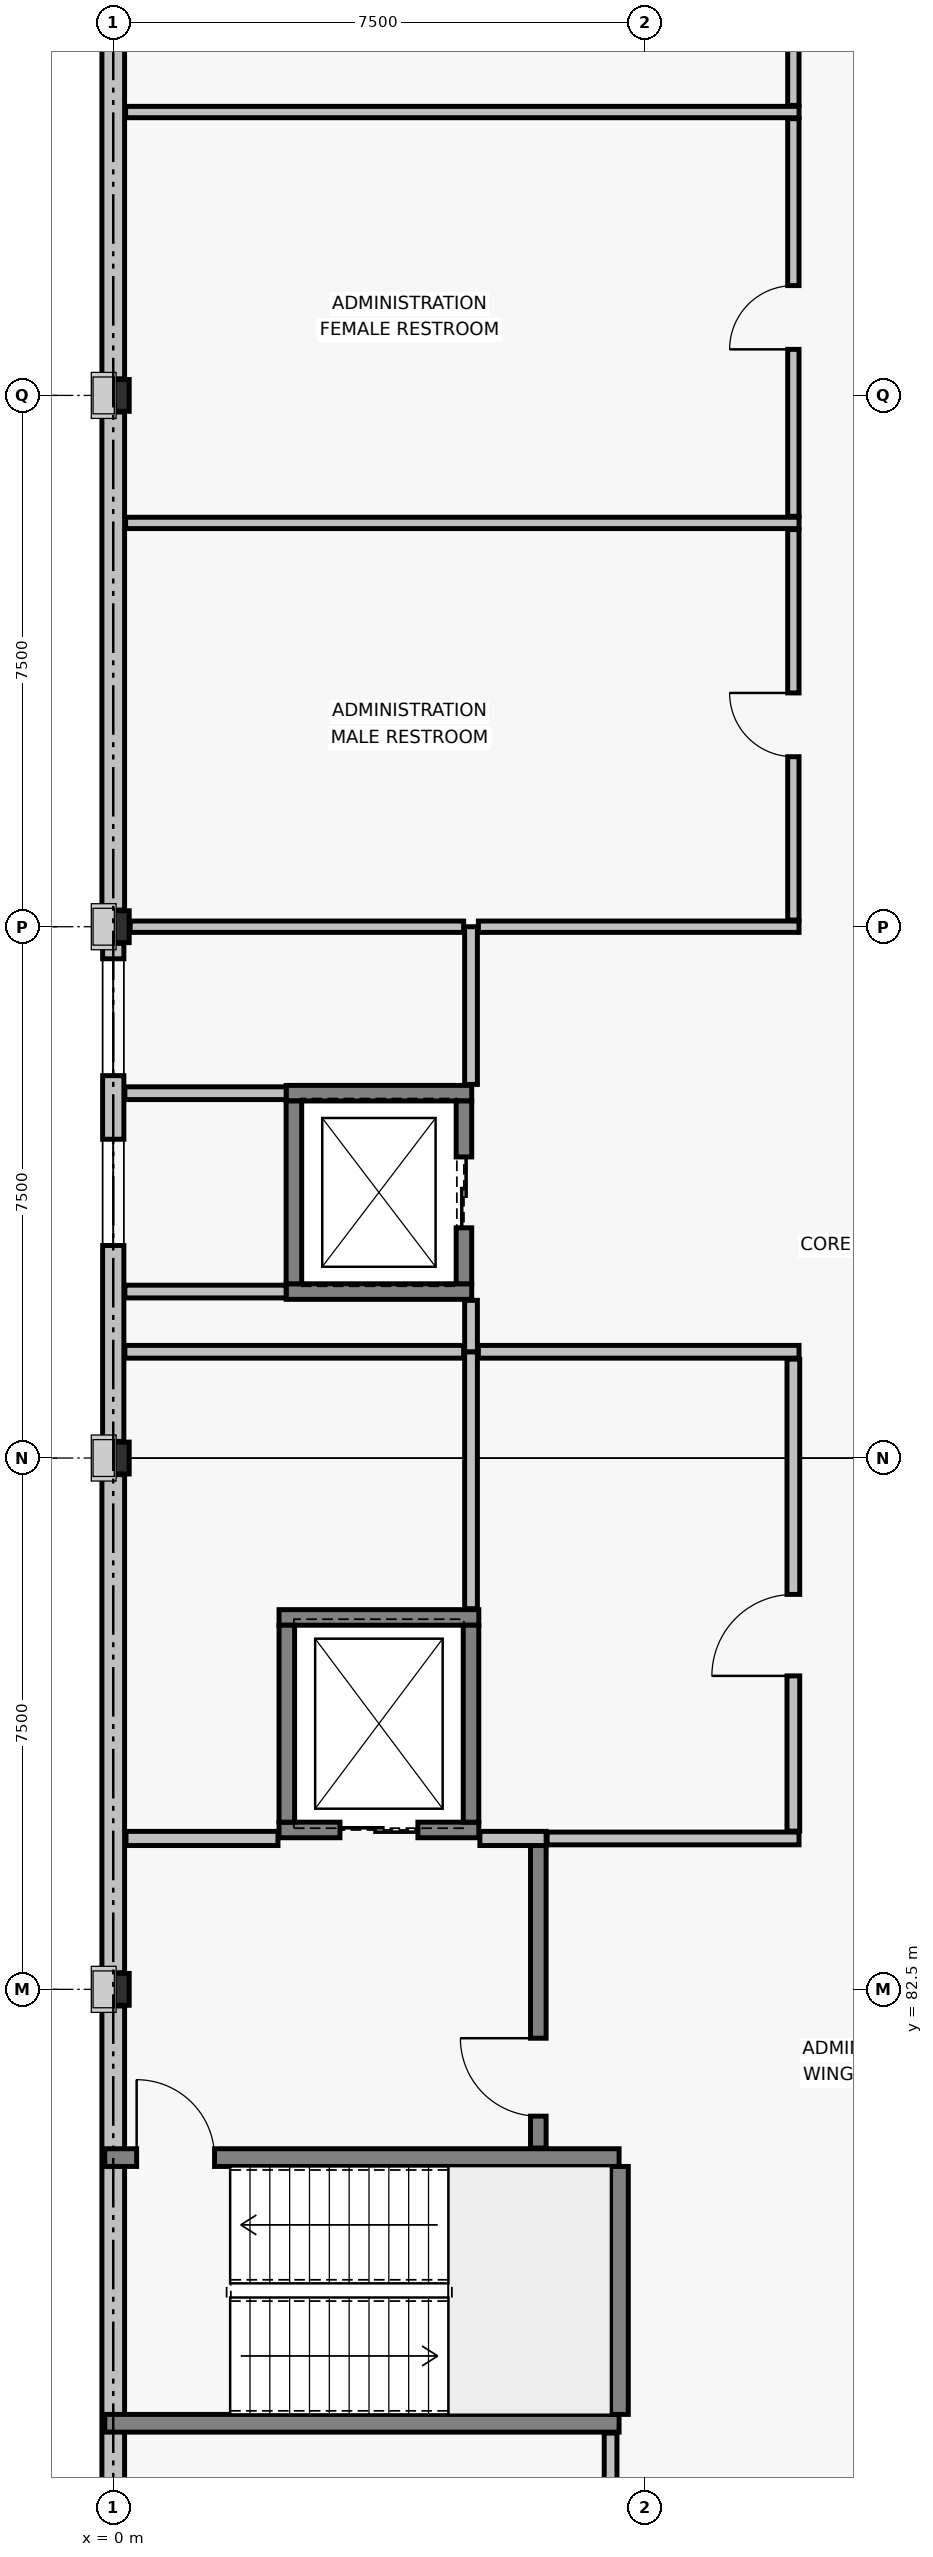
"""IFC4 building model, lengths in metres.
Left out: names, types, materials, properties, quantities, classifications, styles, units other than length and angle.
Written with IfcOpenShell. Run it as: python <this file> out.ifc"""

import sys

from ifc_helpers import new_model, si_unit, direction, frame, frame_2d, origin, origin_2d, place, context, subcontext, project, spatial, rectangle, extrude, element, fill, save


model = new_model("IFC4")
c1 = context("Model", 3, precision=1e-05, world=origin(), true_north=direction((0.0, 1.0)))
c2 = subcontext(c1, "Body", "Model", "MODEL_VIEW")
j1 = project(units=[si_unit("LENGTHUNIT", "METRE"), si_unit("PLANEANGLEUNIT", "RADIAN")], contexts=[c1])
p1 = place(None, origin())
s1 = spatial("IfcSite", under=j1, at=p1, CompositionType="ELEMENT")
p2 = place(p1, origin())
s2 = spatial("IfcBuilding", under=s1, at=p2, CompositionType="ELEMENT")
p3 = place(p2, frame((0.0, 0.0, 21.0)))
s3 = spatial("IfcBuildingStorey", under=s2, at=p3, CompositionType="ELEMENT", Elevation=21.0)
for number, where, z_axis, x_axis in (
    (1, (0.0, 82.5, 0.0), (0.0, 0.0, 1.0), (1.0, 0.0, 0.0)),
    (2, (0.0, 90.0, 0.0), (0.0, 0.0, 1.0), (1.0, 0.0, 0.0)),
    (3, (0.0, 97.5, 0.0), (0.0, 0.0, 1.0), (1.0, 0.0, 0.0)),
    (4, (0.0, 105.0, 0.0), (0.0, 0.0, 1.0), (1.0, 0.0, 0.0)),
):
    element("IfcColumn", number, at=place(p3, frame(where, z_axis=z_axis, x_axis=x_axis)), inside=s3, PredefinedType="COLUMN", context=c2, shape_type="SweptSolid", body=[
        extrude(rectangle(XDim=0.45, YDim=0.45, at=origin_2d()), origin(), (0.0, 0.0, 1.0), 4.2),
    ])
for number, where, z_axis, x_axis in (
    (5, (0.0, 75.235, 0.0), (0.0, 0.0, 1.0), (0.0, 1.0, 0.0)),
    (6, (0.0, 82.735, 0.0), (0.0, 0.0, 1.0), (0.0, 1.0, 0.0)),
):
    element("IfcWall", number, at=place(p3, frame(where, z_axis=z_axis, x_axis=x_axis)), inside=s3, PredefinedType="SOLIDWALL", context=c2, shape_type="SweptSolid", body=[
        extrude(rectangle(XDim=7.03, YDim=0.32, at=frame_2d((3.515, 0.0))), origin(), (0.0, 0.0, 1.0), 2.89),
    ])
p4 = place(p3, frame((0.0, 90.235, 0.0), z_axis=(0.0, 0.0, 1.0), x_axis=(0.0, 1.0, 0.0)))
e7 = element("IfcWall", 7, at=p4, inside=s3, PredefinedType="SOLIDWALL", context=c2, shape_type="SweptSolid", body=[
    extrude(rectangle(XDim=7.03, YDim=0.3, at=frame_2d((3.515, 0.0))), origin(), (0.0, 0.0, 1.0), 2.89),
])
p5 = place(p4, frame((2.765, 0.0, 0.6)))
e8 = element("IfcOpeningElement", 8, at=p5, cuts=e7, PredefinedType="OPENING", context=c2, shape_type="SweptSolid", body=[
    extrude(rectangle(XDim=1.5, YDim=1.2, at=frame_2d((0.75, 0.6))), frame((0.0, 0.16, 0.0), z_axis=(0.0, -1.0, 0.0), x_axis=(1.0, 0.0, 0.0)), (0.0, 0.0, 1.0), 0.32),
])
p6 = place(p4, frame((5.163, 0.0, 0.6)))
e9 = element("IfcOpeningElement", 9, at=p6, cuts=e7, PredefinedType="OPENING", context=c2, shape_type="SweptSolid", body=[
    extrude(rectangle(XDim=1.65, YDim=1.15, at=frame_2d((0.825, 0.575))), frame((0.0, 0.16, 0.0), z_axis=(0.0, -1.0, 0.0), x_axis=(1.0, 0.0, 0.0)), (0.0, 0.0, 1.0), 0.32),
])
for number, where, z_axis, x_axis in (
    (10, (0.0, 97.735, 0.0), (0.0, 0.0, 1.0), (0.0, 1.0, 0.0)),
    (11, (0.0, 105.235, 0.0), (0.0, 0.0, 1.0), (0.0, 1.0, 0.0)),
):
    element("IfcWall", number, at=place(p3, frame(where, z_axis=z_axis, x_axis=x_axis)), inside=s3, PredefinedType="SOLIDWALL", context=c2, shape_type="SweptSolid", body=[
        extrude(rectangle(XDim=7.03, YDim=0.32, at=frame_2d((3.515, 0.0))), origin(), (0.0, 0.0, 1.0), 2.89),
    ])
p7 = place(p3, frame((-0.12, 76.375, 0.0), z_axis=(0.0, 0.0, 1.0), x_axis=(1.0, 0.0, 0.0)))
e12 = element("IfcWall", 12, at=p7, inside=s3, PredefinedType="SOLIDWALL", context=c2, shape_type="SweptSolid", body=[
    extrude(rectangle(XDim=7.26, YDim=0.25, at=frame_2d((3.63, 0.0))), origin(), (0.0, 0.0, 1.0), 3.92),
])
p8 = place(p3, frame((-0.12, 80.125, 0.0), z_axis=(0.0, 0.0, 1.0), x_axis=(1.0, 0.0, 0.0)))
e13 = element("IfcWall", 13, at=p8, inside=s3, PredefinedType="SOLIDWALL", context=c2, shape_type="SweptSolid", body=[
    extrude(rectangle(XDim=7.26, YDim=0.25, at=frame_2d((3.63, 0.0))), origin(), (0.0, 0.0, 1.0), 3.92),
])
p9 = place(p8, frame((0.45, 0.0, 0.0)))
e14 = element("IfcOpeningElement", 14, at=p9, cuts=e13, PredefinedType="OPENING", context=c2, shape_type="SweptSolid", body=[
    extrude(rectangle(XDim=1.1, YDim=2.15, at=frame_2d((0.55, 1.075))), frame((0.0, 0.135, 0.0), z_axis=(0.0, -1.0, 0.0), x_axis=(1.0, 0.0, 0.0)), (0.0, 0.0, 1.0), 0.27),
])
p10 = place(p3, frame((7.145, 76.5, 0.0), z_axis=(0.0, 0.0, 1.0), x_axis=(0.0, 1.0, 0.0)))
e15 = element("IfcWall", 15, at=p10, inside=s3, PredefinedType="SOLIDWALL", context=c2, shape_type="SweptSolid", body=[
    extrude(rectangle(XDim=3.5, YDim=0.25, at=frame_2d((1.75, 0.0))), origin(), (0.0, 0.0, 1.0), 3.92),
])
for number, where, z_axis, x_axis in (
    (16, (2.44, 92.35, 0.0), (0.0, 0.0, 1.0), (1.0, 0.0, 0.0)),
    (17, (2.44, 95.15, 0.0), (0.0, 0.0, 1.0), (1.0, 0.0, 0.0)),
):
    element("IfcWall", number, at=place(p3, frame(where, z_axis=z_axis, x_axis=x_axis)), inside=s3, PredefinedType="SOLIDWALL", context=c2, shape_type="SweptSolid", body=[
        extrude(rectangle(XDim=2.62, YDim=0.22, at=frame_2d((1.31, 0.0))), origin(), (0.0, 0.0, 1.0), 3.92),
    ])
p11 = place(p3, frame((2.55, 92.46, 0.0), z_axis=(0.0, 0.0, 1.0), x_axis=(0.0, 1.0, 0.0)))
e18 = element("IfcWall", 18, at=p11, inside=s3, PredefinedType="SOLIDWALL", context=c2, shape_type="SweptSolid", body=[
    extrude(rectangle(XDim=2.58, YDim=0.22, at=frame_2d((1.29, 0.0))), origin(), (0.0, 0.0, 1.0), 3.92),
])
p12 = place(p3, frame((4.95, 92.46, 0.0), z_axis=(0.0, 0.0, 1.0), x_axis=(0.0, 1.0, 0.0)))
e19 = element("IfcWall", 19, at=p12, inside=s3, PredefinedType="SOLIDWALL", context=c2, shape_type="SweptSolid", body=[
    extrude(rectangle(XDim=2.58, YDim=0.22, at=frame_2d((1.29, 0.0))), origin(), (0.0, 0.0, 1.0), 3.92),
])
p13 = place(p12, frame((0.79, 0.0, 0.0)))
e20 = element("IfcOpeningElement", 20, at=p13, cuts=e19, PredefinedType="OPENING", context=c2, shape_type="SweptSolid", body=[
    extrude(rectangle(XDim=1.0, YDim=2.15, at=frame_2d((0.5, 1.075))), frame((0.0, 0.12, 0.0), z_axis=(0.0, -1.0, 0.0), x_axis=(1.0, 0.0, 0.0)), (0.0, 0.0, 1.0), 0.24),
])
p14 = place(p3, frame((2.34, 84.75, 0.0), z_axis=(0.0, 0.0, 1.0), x_axis=(1.0, 0.0, 0.0)))
e21 = element("IfcWall", 21, at=p14, inside=s3, PredefinedType="SOLIDWALL", context=c2, shape_type="SweptSolid", body=[
    extrude(rectangle(XDim=2.82, YDim=0.22, at=frame_2d((1.41, 0.0))), origin(), (0.0, 0.0, 1.0), 3.92),
])
p15 = place(p14, frame((0.86, 0.0, 0.0)))
e22 = element("IfcOpeningElement", 22, at=p15, cuts=e21, PredefinedType="OPENING", context=c2, shape_type="SweptSolid", body=[
    extrude(rectangle(XDim=1.1, YDim=2.15, at=frame_2d((0.55, 1.075))), frame((0.0, 0.12, 0.0), z_axis=(0.0, -1.0, 0.0), x_axis=(1.0, 0.0, 0.0)), (0.0, 0.0, 1.0), 0.24),
])
p16 = place(p3, frame((2.34, 87.75, 0.0), z_axis=(0.0, 0.0, 1.0), x_axis=(1.0, 0.0, 0.0)))
e23 = element("IfcWall", 23, at=p16, inside=s3, PredefinedType="SOLIDWALL", context=c2, shape_type="SweptSolid", body=[
    extrude(rectangle(XDim=2.82, YDim=0.22, at=frame_2d((1.41, 0.0))), origin(), (0.0, 0.0, 1.0), 3.92),
])
for number, where, z_axis, x_axis in (
    (24, (2.45, 84.86, 0.0), (0.0, 0.0, 1.0), (0.0, 1.0, 0.0)),
    (25, (5.05, 84.86, 0.0), (0.0, 0.0, 1.0), (0.0, 1.0, 0.0)),
):
    element("IfcWall", number, at=place(p3, frame(where, z_axis=z_axis, x_axis=x_axis)), inside=s3, PredefinedType="SOLIDWALL", context=c2, shape_type="SweptSolid", body=[
        extrude(rectangle(XDim=2.78, YDim=0.22, at=frame_2d((1.39, 0.0))), origin(), (0.0, 0.0, 1.0), 3.92),
    ])
p17 = place(p3, frame((6.0, 80.26, 0.0), z_axis=(0.0, 0.0, 1.0), x_axis=(0.0, 1.0, 0.0)))
e26 = element("IfcWall", 26, at=p17, inside=s3, PredefinedType="SOLIDWALL", context=c2, shape_type="SweptSolid", body=[
    extrude(rectangle(XDim=4.37, YDim=0.22, at=frame_2d((2.185, 0.0))), origin(), (0.0, 0.0, 1.0), 3.92),
])
p18 = place(p17, frame((0.45, 0.0, 0.0)))
e27 = element("IfcOpeningElement", 27, at=p18, cuts=e26, PredefinedType="OPENING", context=c2, shape_type="SweptSolid", body=[
    extrude(rectangle(XDim=1.1, YDim=2.15, at=frame_2d((0.55, 1.075))), frame((0.0, 0.12, 0.0), z_axis=(0.0, -1.0, 0.0), x_axis=(1.0, 0.0, 0.0)), (0.0, 0.0, 1.0), 0.24),
])
p19 = place(p3, frame((0.18, 84.63, 0.0), z_axis=(0.0, 0.0, 1.0), x_axis=(1.0, 0.0, 0.0)))
e28 = element("IfcWall", 28, at=p19, inside=s3, PredefinedType="PARTITIONING", context=c2, shape_type="SweptSolid", body=[
    extrude(rectangle(XDim=2.145, YDim=0.2, at=frame_2d((1.073, 0.0))), origin(), (0.0, 0.0, 1.0), 3.15),
])
p20 = place(p3, frame((5.175, 84.63, 0.0), z_axis=(0.0, 0.0, 1.0), x_axis=(1.0, 0.0, 0.0)))
e29 = element("IfcWall", 29, at=p20, inside=s3, PredefinedType="PARTITIONING", context=c2, shape_type="SweptSolid", body=[
    extrude(rectangle(XDim=0.935, YDim=0.2, at=frame_2d((0.468, 0.0))), origin(), (0.0, 0.0, 1.0), 3.6),
])
p21 = place(p3, frame((7.02, 75.0, 0.0), z_axis=(0.0, 0.0, 1.0), x_axis=(0.0, 1.0, 0.0)))
e30 = element("IfcWall", 30, at=p21, inside=s3, PredefinedType="PARTITIONING", context=c2, shape_type="SweptSolid", body=[
    extrude(rectangle(XDim=1.236, YDim=0.18, at=frame_2d((0.618, 0.0))), origin(), (0.0, 0.0, 1.0), 2.89),
])
p22 = place(p3, frame((5.05, 87.874, 0.0), z_axis=(0.0, 0.0, 1.0), x_axis=(0.0, 1.0, 0.0)))
e31 = element("IfcWall", 31, at=p22, inside=s3, PredefinedType="PARTITIONING", context=c2, shape_type="SweptSolid", body=[
    extrude(rectangle(XDim=3.626, YDim=0.18, at=frame_2d((1.813, 0.0))), origin(), (0.0, 0.0, 1.0), 2.89),
])
p23 = place(p3, frame((6.124, 84.63, 0.0), z_axis=(0.0, 0.0, 1.0), x_axis=(1.0, 0.0, 0.0)))
e32 = element("IfcWall", 32, at=p23, inside=s3, PredefinedType="PARTITIONING", context=c2, shape_type="SweptSolid", body=[
    extrude(rectangle(XDim=3.556, YDim=0.18, at=frame_2d((1.778, 0.0))), origin(), (0.0, 0.0, 1.0), 3.27),
])
p24 = place(p3, frame((0.164, 91.5, 0.0), z_axis=(0.0, 0.0, 1.0), x_axis=(1.0, 0.0, 0.0)))
e33 = element("IfcWall", 33, at=p24, inside=s3, PredefinedType="PARTITIONING", context=c2, shape_type="SweptSolid", body=[
    extrude(rectangle(XDim=4.782, YDim=0.18, at=frame_2d((2.391, 0.0))), origin(), (0.0, 0.0, 1.0), 3.14),
])
p25 = place(p3, frame((5.154, 91.5, 0.0), z_axis=(0.0, 0.0, 1.0), x_axis=(1.0, 0.0, 0.0)))
e34 = element("IfcWall", 34, at=p25, inside=s3, PredefinedType="PARTITIONING", context=c2, shape_type="SweptSolid", body=[
    extrude(rectangle(XDim=4.526, YDim=0.18, at=frame_2d((2.263, 0.0))), origin(), (0.0, 0.0, 1.0), 3.27),
])
p26 = place(p3, frame((9.6, 84.734, 0.0), z_axis=(0.0, 0.0, 1.0), x_axis=(0.0, 1.0, 0.0)))
e35 = element("IfcWall", 35, at=p26, inside=s3, PredefinedType="PARTITIONING", context=c2, shape_type="SweptSolid", body=[
    extrude(rectangle(XDim=6.662, YDim=0.18, at=frame_2d((3.331, 0.0))), origin(), (0.0, 0.0, 1.0), 2.89),
])
p27 = place(p26, frame((2.191, 0.0, 0.0)))
e36 = element("IfcOpeningElement", 36, at=p27, cuts=e35, PredefinedType="OPENING", context=c2, shape_type="SweptSolid", body=[
    extrude(rectangle(XDim=1.15, YDim=2.14, at=frame_2d((0.575, 1.07))), frame((0.0, 0.1, 0.0), z_axis=(0.0, -1.0, 0.0), x_axis=(1.0, 0.0, 0.0)), (0.0, 0.0, 1.0), 0.2),
])
for number, where, z_axis, x_axis in (
    (37, (0.164, 92.35, 0.0), (0.0, 0.0, 1.0), (1.0, 0.0, 0.0)),
    (38, (0.164, 95.15, 0.0), (0.0, 0.0, 1.0), (1.0, 0.0, 0.0)),
):
    element("IfcWall", number, at=place(p3, frame(where, z_axis=z_axis, x_axis=x_axis)), inside=s3, PredefinedType="PARTITIONING", context=c2, shape_type="SweptSolid", body=[
        extrude(rectangle(XDim=2.276, YDim=0.18, at=frame_2d((1.138, 0.0))), origin(), (0.0, 0.0, 1.0), 3.14),
    ])
p28 = place(p3, frame((5.05, 91.5, 0.0), z_axis=(0.0, 0.0, 1.0), x_axis=(0.0, 1.0, 0.0)))
e39 = element("IfcWall", 39, at=p28, inside=s3, PredefinedType="PARTITIONING", context=c2, shape_type="SweptSolid", body=[
    extrude(rectangle(XDim=0.726, YDim=0.18, at=frame_2d((0.363, 0.0))), origin(), (0.0, 0.0, 1.0), 3.27),
])
p29 = place(p3, frame((5.05, 95.274, 0.0), z_axis=(0.0, 0.0, 1.0), x_axis=(0.0, 1.0, 0.0)))
e40 = element("IfcWall", 40, at=p29, inside=s3, PredefinedType="PARTITIONING", context=c2, shape_type="SweptSolid", body=[
    extrude(rectangle(XDim=2.226, YDim=0.18, at=frame_2d((1.113, 0.0))), origin(), (0.0, 0.0, 1.0), 2.89),
])
p30 = place(p3, frame((0.239, 97.5, 0.0), z_axis=(0.0, 0.0, 1.0), x_axis=(1.0, 0.0, 0.0)))
e41 = element("IfcWall", 41, at=p30, inside=s3, PredefinedType="PARTITIONING", context=c2, shape_type="SweptSolid", body=[
    extrude(rectangle(XDim=4.707, YDim=0.16, at=frame_2d((2.354, 0.0))), origin(), (0.0, 0.0, 1.0), 2.89),
])
p31 = place(p3, frame((5.154, 97.5, 0.0), z_axis=(0.0, 0.0, 1.0), x_axis=(1.0, 0.0, 0.0)))
e42 = element("IfcWall", 42, at=p31, inside=s3, PredefinedType="PARTITIONING", context=c2, shape_type="SweptSolid", body=[
    extrude(rectangle(XDim=4.526, YDim=0.16, at=frame_2d((2.263, 0.0))), origin(), (0.0, 0.0, 1.0), 2.89),
])
p32 = place(p3, frame((0.174, 103.2, 0.0), z_axis=(0.0, 0.0, 1.0), x_axis=(1.0, 0.0, 0.0)))
e43 = element("IfcWall", 43, at=p32, inside=s3, PredefinedType="PARTITIONING", context=c2, shape_type="SweptSolid", body=[
    extrude(rectangle(XDim=9.506, YDim=0.16, at=frame_2d((4.753, 0.0))), origin(), (0.0, 0.0, 1.0), 3.27),
])
p33 = place(p3, frame((0.174, 109.0, 0.0), z_axis=(0.0, 0.0, 1.0), x_axis=(1.0, 0.0, 0.0)))
e44 = element("IfcWall", 44, at=p33, inside=s3, PredefinedType="PARTITIONING", context=c2, shape_type="SweptSolid", body=[
    extrude(rectangle(XDim=9.506, YDim=0.16, at=frame_2d((4.753, 0.0))), origin(), (0.0, 0.0, 1.0), 3.14),
])
p34 = place(p3, frame((9.6, 97.594, 0.0), z_axis=(0.0, 0.0, 1.0), x_axis=(0.0, 1.0, 0.0)))
e45 = element("IfcWall", 45, at=p34, inside=s3, PredefinedType="PARTITIONING", context=c2, shape_type="SweptSolid", body=[
    extrude(rectangle(XDim=5.512, YDim=0.16, at=frame_2d((2.756, 0.0))), origin(), (0.0, 0.0, 1.0), 2.89),
])
p35 = place(p34, frame((2.306, 0.0, 0.0)))
e46 = element("IfcOpeningElement", 46, at=p35, cuts=e45, PredefinedType="OPENING", context=c2, shape_type="SweptSolid", body=[
    extrude(rectangle(XDim=0.9, YDim=2.1, at=frame_2d((0.45, 1.05))), frame((0.0, 0.09, 0.0), z_axis=(0.0, -1.0, 0.0), x_axis=(1.0, 0.0, 0.0)), (0.0, 0.0, 1.0), 0.18),
])
p36 = place(p3, frame((9.6, 103.294, 0.0), z_axis=(0.0, 0.0, 1.0), x_axis=(0.0, 1.0, 0.0)))
e47 = element("IfcWall", 47, at=p36, inside=s3, PredefinedType="PARTITIONING", context=c2, shape_type="SweptSolid", body=[
    extrude(rectangle(XDim=5.612, YDim=0.16, at=frame_2d((2.806, 0.0))), origin(), (0.0, 0.0, 1.0), 2.89),
])
p37 = place(p36, frame((2.356, 0.0, 0.0)))
e48 = element("IfcOpeningElement", 48, at=p37, cuts=e47, PredefinedType="OPENING", context=c2, shape_type="SweptSolid", body=[
    extrude(rectangle(XDim=0.9, YDim=2.1, at=frame_2d((0.45, 1.05))), frame((0.0, 0.09, 0.0), z_axis=(0.0, -1.0, 0.0), x_axis=(1.0, 0.0, 0.0)), (0.0, 0.0, 1.0), 0.18),
])
p38 = place(p3, frame((9.6, 109.094, 0.0), z_axis=(0.0, 0.0, 1.0), x_axis=(0.0, 1.0, 0.0)))
e49 = element("IfcWall", 49, at=p38, inside=s3, PredefinedType="PARTITIONING", context=c2, shape_type="SweptSolid", body=[
    extrude(rectangle(XDim=3.242, YDim=0.16, at=frame_2d((1.621, 0.0))), origin(), (0.0, 0.0, 1.0), 2.89),
])
p39 = place(p38, frame((1.181, 0.0, 0.0)))
e50 = element("IfcOpeningElement", 50, at=p39, cuts=e49, PredefinedType="OPENING", context=c2, shape_type="SweptSolid", body=[
    extrude(rectangle(XDim=0.95, YDim=2.1, at=frame_2d((0.475, 1.05))), frame((0.0, 0.09, 0.0), z_axis=(0.0, -1.0, 0.0), x_axis=(1.0, 0.0, 0.0)), (0.0, 0.0, 1.0), 0.18),
])
p40 = place(p5, origin())
e51 = element("IfcWindow", 51, at=p40, inside=s3, PartitioningType="SINGLE_PANEL", PredefinedType="WINDOW", context=c2, shape_type="SweptSolid", body=[
    extrude(rectangle(XDim=1.5, YDim=1.2, at=frame_2d((0.75, 0.6))), frame((0.0, 0.03, 0.0), z_axis=(0.0, -1.0, 0.0), x_axis=(1.0, 0.0, 0.0)), (0.0, 0.0, 1.0), 0.06),
])
fill(e8, e51)
p41 = place(p6, origin())
e52 = element("IfcWindow", 52, at=p41, inside=s3, PartitioningType="SINGLE_PANEL", PredefinedType="WINDOW", context=c2, shape_type="SweptSolid", body=[
    extrude(rectangle(XDim=1.65, YDim=1.15, at=frame_2d((0.825, 0.575))), frame((0.0, 0.03, 0.0), z_axis=(0.0, -1.0, 0.0), x_axis=(1.0, 0.0, 0.0)), (0.0, 0.0, 1.0), 0.06),
])
fill(e9, e52)
p42 = place(p9, origin())
e53 = element("IfcDoor", 53, at=p42, inside=s3, OperationType="SINGLE_SWING_LEFT", PredefinedType="DOOR", context=c2, shape_type="SweptSolid", body=[
    extrude(rectangle(XDim=1.1, YDim=2.15, at=frame_2d((0.55, 1.075))), frame((0.0, 0.025, 0.0), z_axis=(0.0, -1.0, 0.0), x_axis=(1.0, 0.0, 0.0)), (0.0, 0.0, 1.0), 0.05),
])
fill(e14, e53)
p43 = place(p13, origin())
e54 = element("IfcDoor", 54, at=p43, inside=s3, OperationType="SLIDING_TO_LEFT", PredefinedType="DOOR", context=c2, shape_type="SweptSolid", body=[
    extrude(rectangle(XDim=1.0, YDim=2.15, at=frame_2d((0.5, 1.075))), frame((0.0, 0.025, 0.0), z_axis=(0.0, -1.0, 0.0), x_axis=(1.0, 0.0, 0.0)), (0.0, 0.0, 1.0), 0.05),
])
fill(e20, e54)
p44 = place(p15, origin())
e55 = element("IfcDoor", 55, at=p44, inside=s3, OperationType="SLIDING_TO_LEFT", PredefinedType="DOOR", context=c2, shape_type="SweptSolid", body=[
    extrude(rectangle(XDim=1.1, YDim=2.15, at=frame_2d((0.55, 1.075))), frame((0.0, 0.025, 0.0), z_axis=(0.0, -1.0, 0.0), x_axis=(1.0, 0.0, 0.0)), (0.0, 0.0, 1.0), 0.05),
])
fill(e22, e55)
p45 = place(p18, origin())
e56 = element("IfcDoor", 56, at=p45, inside=s3, OperationType="SINGLE_SWING_RIGHT", PredefinedType="DOOR", context=c2, shape_type="SweptSolid", body=[
    extrude(rectangle(XDim=1.1, YDim=2.15, at=frame_2d((0.55, 1.075))), frame((0.0, 0.025, 0.0), z_axis=(0.0, -1.0, 0.0), x_axis=(1.0, 0.0, 0.0)), (0.0, 0.0, 1.0), 0.05),
])
fill(e27, e56)
p46 = place(p27, origin())
e57 = element("IfcDoor", 57, at=p46, inside=s3, OperationType="SINGLE_SWING_LEFT", PredefinedType="DOOR", context=c2, shape_type="SweptSolid", body=[
    extrude(rectangle(XDim=1.15, YDim=2.14, at=frame_2d((0.575, 1.07))), frame((0.0, 0.025, 0.0), z_axis=(0.0, -1.0, 0.0), x_axis=(1.0, 0.0, 0.0)), (0.0, 0.0, 1.0), 0.05),
])
fill(e36, e57)
p47 = place(p35, origin())
e58 = element("IfcDoor", 58, at=p47, inside=s3, OperationType="SINGLE_SWING_RIGHT", PredefinedType="DOOR", context=c2, shape_type="SweptSolid", body=[
    extrude(rectangle(XDim=0.9, YDim=2.1, at=frame_2d((0.45, 1.05))), frame((0.0, 0.025, 0.0), z_axis=(0.0, -1.0, 0.0), x_axis=(1.0, 0.0, 0.0)), (0.0, 0.0, 1.0), 0.05),
])
fill(e46, e58)
p48 = place(p37, origin())
e59 = element("IfcDoor", 59, at=p48, inside=s3, OperationType="SINGLE_SWING_LEFT", PredefinedType="DOOR", context=c2, shape_type="SweptSolid", body=[
    extrude(rectangle(XDim=0.9, YDim=2.1, at=frame_2d((0.45, 1.05))), frame((0.0, 0.025, 0.0), z_axis=(0.0, -1.0, 0.0), x_axis=(1.0, 0.0, 0.0)), (0.0, 0.0, 1.0), 0.05),
])
fill(e48, e59)
save(model, sys.argv[1])
